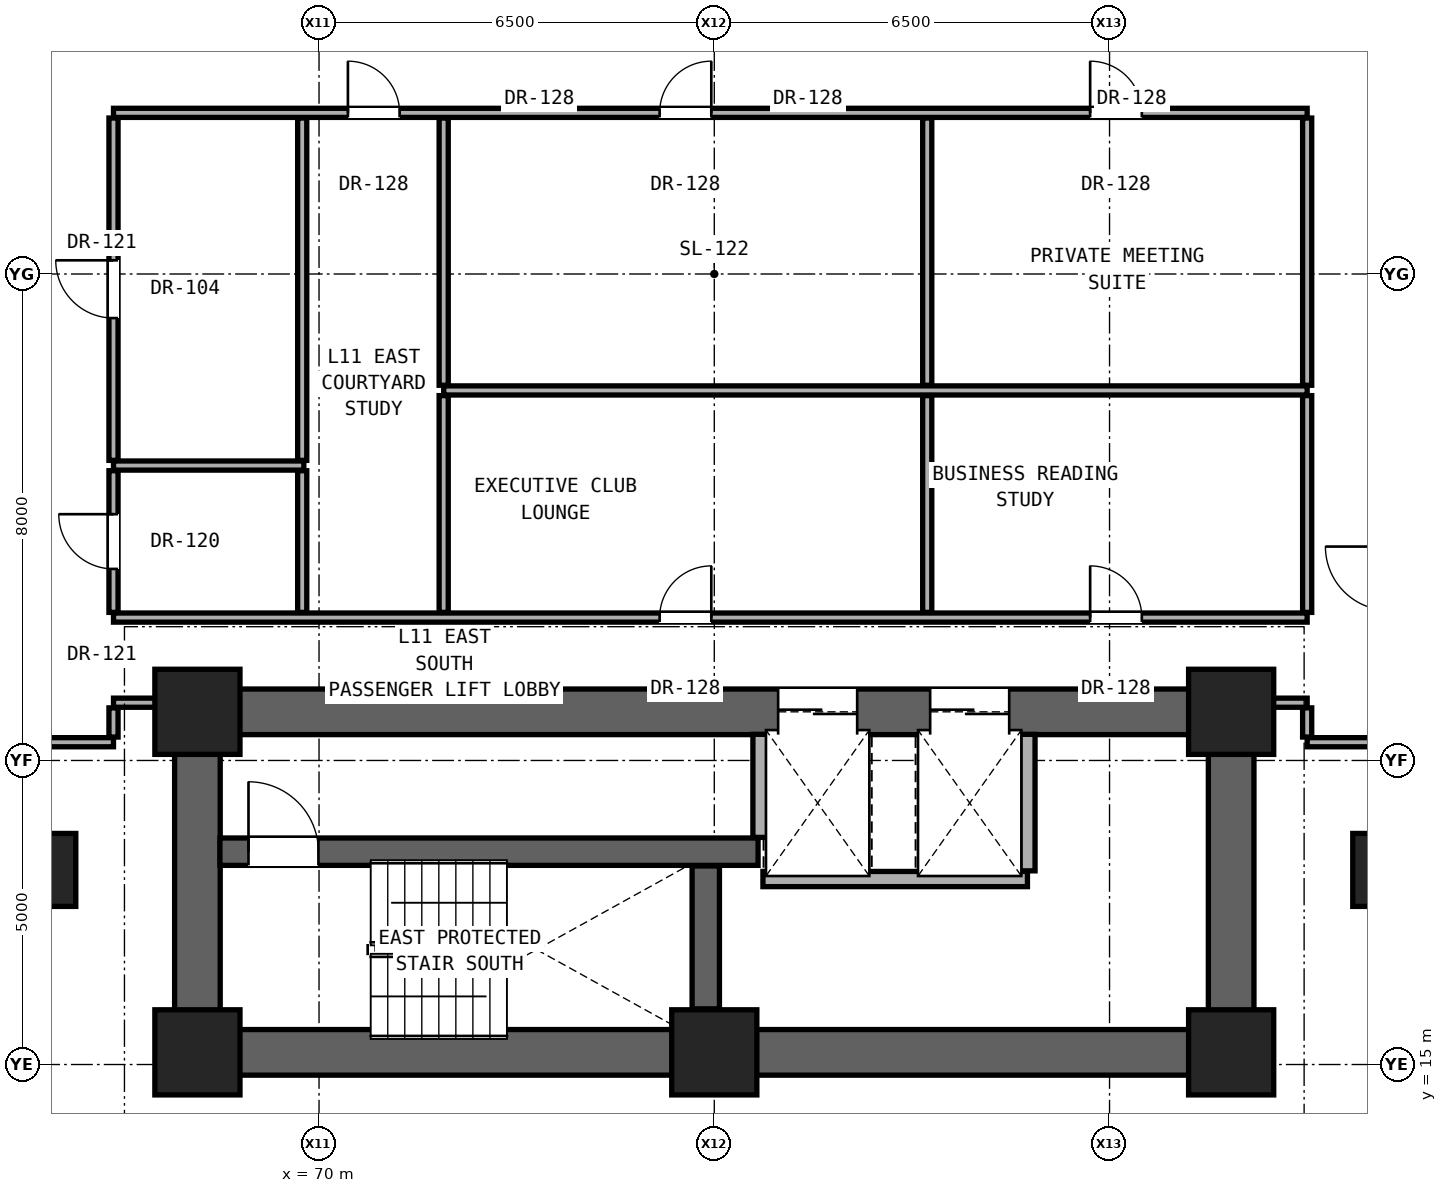
"""IFC4 building model, lengths in metres.
Left out: names, types, materials, properties, quantities, classifications, styles, units other than length and angle.
Written with IfcOpenShell. Run it as: python <this file> out.ifc"""

import sys

from ifc_helpers import new_model, si_unit, direction, frame, frame_2d, origin, origin_2d, place, context, subcontext, project, spatial, rectangle, extrude, element, fill, save


model = new_model("IFC4")
c1 = context("Model", 3, precision=1e-05, world=origin(), true_north=direction((0.0, 1.0)))
c2 = subcontext(c1, "Body", "Model", "MODEL_VIEW")
j1 = project(units=[si_unit("LENGTHUNIT", "METRE"), si_unit("PLANEANGLEUNIT", "RADIAN")], contexts=[c1])
p1 = place(None, origin())
s1 = spatial("IfcSite", under=j1, at=p1, CompositionType="ELEMENT")
p2 = place(p1, origin())
s2 = spatial("IfcBuilding", under=s1, at=p2, CompositionType="ELEMENT")
p3 = place(p2, frame((0.0, 0.0, 42.2)))
s3 = spatial("IfcBuildingStorey", under=s2, at=p3, CompositionType="ELEMENT", Elevation=42.2)
for number, where, z_axis, x_axis in (
    (1, (68.0, 15.2, 0.0), (0.0, 0.0, 1.0), (1.0, 0.0, 0.0)),
    (2, (76.5, 15.2, 0.0), (0.0, 0.0, 1.0), (1.0, 0.0, 0.0)),
    (3, (85.0, 15.2, 0.0), (0.0, 0.0, 1.0), (1.0, 0.0, 0.0)),
    (4, (68.0, 20.8, 0.0), (0.0, 0.0, 1.0), (1.0, 0.0, 0.0)),
    (5, (85.0, 20.8, 0.0), (0.0, 0.0, 1.0), (1.0, 0.0, 0.0)),
):
    element("IfcColumn", number, at=place(p3, frame(where, z_axis=z_axis, x_axis=x_axis)), inside=s3, PredefinedType="COLUMN", context=c2, shape_type="SweptSolid", body=[
        extrude(rectangle(XDim=1.4, YDim=1.4, at=origin_2d()), origin(), (0.0, 0.0, 1.0), 3.3),
    ])
for number, where, z_axis, x_axis in (
    (6, (65.6, 18.2, 0.0), (0.0, 0.0, 1.0), (1.0, 0.0, 0.0)),
    (7, (87.4, 18.2, 0.0), (0.0, 0.0, 1.0), (1.0, 0.0, 0.0)),
):
    element("IfcColumn", number, at=place(p3, frame(where, z_axis=z_axis, x_axis=x_axis)), inside=s3, PredefinedType="PILASTER", context=c2, shape_type="SweptSolid", body=[
        extrude(rectangle(XDim=0.8, YDim=1.2, at=origin_2d()), origin(), (0.0, 0.0, 1.0), 3.3),
    ])
p4 = place(p3, frame((68.0, 15.2, 0.0), z_axis=(0.0, 0.0, 1.0), x_axis=(1.0, 0.0, 0.0)))
e8 = element("IfcWall", 8, at=p4, inside=s3, PredefinedType="SHEAR", context=c2, shape_type="SweptSolid", body=[
    extrude(rectangle(XDim=17.0, YDim=0.75, at=frame_2d((8.5, 0.0))), origin(), (0.0, 0.0, 1.0), 3.06),
])
for number, where, z_axis, x_axis in (
    (9, (68.0, 15.2, 0.0), (0.0, 0.0, 1.0), (0.0, 1.0, 0.0)),
    (10, (85.0, 15.2, 0.0), (0.0, 0.0, 1.0), (0.0, 1.0, 0.0)),
):
    element("IfcWall", number, at=place(p3, frame(where, z_axis=z_axis, x_axis=x_axis)), inside=s3, PredefinedType="SHEAR", context=c2, shape_type="SweptSolid", body=[
        extrude(rectangle(XDim=5.6, YDim=0.75, at=frame_2d((2.8, 0.0))), origin(), (0.0, 0.0, 1.0), 3.06),
    ])
p5 = place(p3, frame((68.0, 20.8, 0.0), z_axis=(0.0, 0.0, 1.0), x_axis=(1.0, 0.0, 0.0)))
e11 = element("IfcWall", 11, at=p5, inside=s3, PredefinedType="SHEAR", context=c2, shape_type="SweptSolid", body=[
    extrude(rectangle(XDim=17.0, YDim=0.75, at=frame_2d((8.5, 0.0))), origin(), (0.0, 0.0, 1.0), 3.06),
])
p6 = place(p5, frame((9.55, 0.0, 0.0)))
e12 = element("IfcOpeningElement", 12, at=p6, cuts=e11, PredefinedType="OPENING", context=c2, shape_type="SweptSolid", body=[
    extrude(rectangle(XDim=1.3, YDim=2.3, at=frame_2d((0.65, 1.15))), frame((0.0, 0.385, 0.0), z_axis=(0.0, -1.0, 0.0), x_axis=(1.0, 0.0, 0.0)), (0.0, 0.0, 1.0), 0.77),
])
p7 = place(p5, frame((12.05, 0.0, 0.0)))
e13 = element("IfcOpeningElement", 13, at=p7, cuts=e11, PredefinedType="OPENING", context=c2, shape_type="SweptSolid", body=[
    extrude(rectangle(XDim=1.3, YDim=2.3, at=frame_2d((0.65, 1.15))), frame((0.0, 0.385, 0.0), z_axis=(0.0, -1.0, 0.0), x_axis=(1.0, 0.0, 0.0)), (0.0, 0.0, 1.0), 0.77),
])
p8 = place(p3, frame((77.3, 18.05, 0.0), z_axis=(0.0, 0.0, 1.0), x_axis=(1.0, 0.0, 0.0)))
e14 = element("IfcWall", 14, at=p8, inside=s3, PredefinedType="SOLIDWALL", context=c2, shape_type="SweptSolid", body=[
    extrude(rectangle(XDim=4.35, YDim=0.25, at=frame_2d((2.175, 0.0))), origin(), (0.0, 0.0, 1.0), 3.06),
])
p9 = place(p3, frame((68.37, 18.5, 0.0), z_axis=(0.0, 0.0, 1.0), x_axis=(1.0, 0.0, 0.0)))
e15 = element("IfcWall", 15, at=p9, inside=s3, PredefinedType="SHEAR", context=c2, shape_type="SweptSolid", body=[
    extrude(rectangle(XDim=8.85, YDim=0.45, at=frame_2d((4.425, 0.0))), origin(), (0.0, 0.0, 1.0), 3.06),
])
p10 = place(p9, frame((0.47, 0.0, 0.0)))
e16 = element("IfcOpeningElement", 16, at=p10, cuts=e15, PredefinedType="OPENING", context=c2, shape_type="SweptSolid", body=[
    extrude(rectangle(XDim=1.15, YDim=2.2, at=frame_2d((0.575, 1.1))), frame((0.0, 0.235, 0.0), z_axis=(0.0, -1.0, 0.0), x_axis=(1.0, 0.0, 0.0)), (0.0, 0.0, 1.0), 0.47),
])
p11 = place(p3, frame((65.25, 20.3, 0.0), z_axis=(0.0, 0.0, 1.0), x_axis=(1.0, 0.0, 0.0)))
e17 = element("IfcWall", 17, at=p11, inside=s3, PredefinedType="PARTITIONING", context=c2, shape_type="SweptSolid", body=[
    extrude(rectangle(XDim=1.37, YDim=0.15, at=frame_2d((0.685, 0.0))), origin(), (0.0, 0.0, 1.0), 3.06),
])
p12 = place(p3, frame((86.25, 20.3, 0.0), z_axis=(0.0, 0.0, 1.0), x_axis=(1.0, 0.0, 0.0)))
e18 = element("IfcWall", 18, at=p12, inside=s3, PredefinedType="PARTITIONING", context=c2, shape_type="SweptSolid", body=[
    extrude(rectangle(XDim=1.35, YDim=0.15, at=frame_2d((0.675, 0.0))), origin(), (0.0, 0.0, 1.0), 3.06),
])
p13 = place(p3, frame((66.62, 20.95, 0.0), z_axis=(0.0, 0.0, 1.0), x_axis=(1.0, 0.0, 0.0)))
e19 = element("IfcWall", 19, at=p13, inside=s3, PredefinedType="PARTITIONING", context=c2, shape_type="SweptSolid", body=[
    extrude(rectangle(XDim=1.01, YDim=0.15, at=frame_2d((0.505, 0.0))), origin(), (0.0, 0.0, 1.0), 2.452),
])
p14 = place(p3, frame((85.37, 20.95, 0.0), z_axis=(0.0, 0.0, 1.0), x_axis=(1.0, 0.0, 0.0)))
e20 = element("IfcWall", 20, at=p14, inside=s3, PredefinedType="PARTITIONING", context=c2, shape_type="SweptSolid", body=[
    extrude(rectangle(XDim=0.88, YDim=0.15, at=frame_2d((0.44, 0.0))), origin(), (0.0, 0.0, 1.0), 2.452),
])
p15 = place(p3, frame((66.62, 22.35, 0.0), z_axis=(0.0, 0.0, 1.0), x_axis=(1.0, 0.0, 0.0)))
e21 = element("IfcWall", 21, at=p15, inside=s3, PredefinedType="PARTITIONING", context=c2, shape_type="SweptSolid", body=[
    extrude(rectangle(XDim=19.63, YDim=0.15, at=frame_2d((9.815, 0.0))), origin(), (0.0, 0.0, 1.0), 2.125),
])
p16 = place(p15, frame((8.981, 0.0, 0.0)))
e22 = element("IfcOpeningElement", 22, at=p16, cuts=e21, PredefinedType="OPENING", context=c2, shape_type="SweptSolid", body=[
    extrude(rectangle(XDim=0.85, YDim=2.01, at=frame_2d((0.425, 1.005))), frame((0.0, 0.085, 0.0), z_axis=(0.0, -1.0, 0.0), x_axis=(1.0, 0.0, 0.0)), (0.0, 0.0, 1.0), 0.17),
])
p17 = place(p15, frame((16.061, 0.0, 0.0)))
e23 = element("IfcOpeningElement", 23, at=p17, cuts=e21, PredefinedType="OPENING", context=c2, shape_type="SweptSolid", body=[
    extrude(rectangle(XDim=0.85, YDim=2.01, at=frame_2d((0.425, 1.005))), frame((0.0, 0.085, 0.0), z_axis=(0.0, -1.0, 0.0), x_axis=(1.0, 0.0, 0.0)), (0.0, 0.0, 1.0), 0.17),
])
p18 = place(p3, frame((66.62, 24.85, 0.0), z_axis=(0.0, 0.0, 1.0), x_axis=(1.0, 0.0, 0.0)))
e24 = element("IfcWall", 24, at=p18, inside=s3, PredefinedType="PARTITIONING", context=c2, shape_type="SweptSolid", body=[
    extrude(rectangle(XDim=3.13, YDim=0.15, at=frame_2d((1.565, 0.0))), origin(), (0.0, 0.0, 1.0), 2.125),
])
p19 = place(p3, frame((72.05, 26.085, 0.0), z_axis=(0.0, 0.0, 1.0), x_axis=(1.0, 0.0, 0.0)))
e25 = element("IfcWall", 25, at=p19, inside=s3, PredefinedType="PARTITIONING", context=c2, shape_type="SweptSolid", body=[
    extrude(rectangle(XDim=14.2, YDim=0.15, at=frame_2d((7.1, 0.0))), origin(), (0.0, 0.0, 1.0), 2.125),
])
p20 = place(p3, frame((66.62, 30.65, 0.0), z_axis=(0.0, 0.0, 1.0), x_axis=(1.0, 0.0, 0.0)))
e26 = element("IfcWall", 26, at=p20, inside=s3, PredefinedType="PARTITIONING", context=c2, shape_type="SweptSolid", body=[
    extrude(rectangle(XDim=19.63, YDim=0.15, at=frame_2d((9.815, 0.0))), origin(), (0.0, 0.0, 1.0), 2.125),
])
p21 = place(p20, frame((3.855, 0.0, 0.0)))
e27 = element("IfcOpeningElement", 27, at=p21, cuts=e26, PredefinedType="OPENING", context=c2, shape_type="SweptSolid", body=[
    extrude(rectangle(XDim=0.85, YDim=2.01, at=frame_2d((0.425, 1.005))), frame((0.0, 0.085, 0.0), z_axis=(0.0, -1.0, 0.0), x_axis=(1.0, 0.0, 0.0)), (0.0, 0.0, 1.0), 0.17),
])
p22 = place(p20, frame((8.981, 0.0, 0.0)))
e28 = element("IfcOpeningElement", 28, at=p22, cuts=e26, PredefinedType="OPENING", context=c2, shape_type="SweptSolid", body=[
    extrude(rectangle(XDim=0.85, YDim=2.01, at=frame_2d((0.425, 1.005))), frame((0.0, 0.085, 0.0), z_axis=(0.0, -1.0, 0.0), x_axis=(1.0, 0.0, 0.0)), (0.0, 0.0, 1.0), 0.17),
])
p23 = place(p20, frame((16.061, 0.0, 0.0)))
e29 = element("IfcOpeningElement", 29, at=p23, cuts=e26, PredefinedType="OPENING", context=c2, shape_type="SweptSolid", body=[
    extrude(rectangle(XDim=0.85, YDim=2.01, at=frame_2d((0.425, 1.005))), frame((0.0, 0.085, 0.0), z_axis=(0.0, -1.0, 0.0), x_axis=(1.0, 0.0, 0.0)), (0.0, 0.0, 1.0), 0.17),
])
p24 = place(p3, frame((66.62, 20.385, 0.0), z_axis=(0.0, 0.0, 1.0), x_axis=(0.0, 1.0, 0.0)))
e30 = element("IfcWall", 30, at=p24, inside=s3, PredefinedType="PARTITIONING", context=c2, shape_type="SweptSolid", body=[
    extrude(rectangle(XDim=0.48, YDim=0.15, at=frame_2d((0.24, 0.0))), origin(), (0.0, 0.0, 1.0), 2.452),
])
p25 = place(p3, frame((66.62, 22.435, 0.0), z_axis=(0.0, 0.0, 1.0), x_axis=(0.0, 1.0, 0.0)))
e31 = element("IfcWall", 31, at=p25, inside=s3, PredefinedType="PARTITIONING", context=c2, shape_type="SweptSolid", body=[
    extrude(rectangle(XDim=2.33, YDim=0.15, at=frame_2d((1.165, 0.0))), origin(), (0.0, 0.0, 1.0), 3.06),
])
p26 = place(p25, frame((0.715, 0.0, 0.0)))
e32 = element("IfcOpeningElement", 32, at=p26, cuts=e31, PredefinedType="OPENING", context=c2, shape_type="SweptSolid", body=[
    extrude(rectangle(XDim=0.9, YDim=2.1, at=frame_2d((0.45, 1.05))), frame((0.0, 0.085, 0.0), z_axis=(0.0, -1.0, 0.0), x_axis=(1.0, 0.0, 0.0)), (0.0, 0.0, 1.0), 0.17),
])
p27 = place(p3, frame((66.62, 24.935, 0.0), z_axis=(0.0, 0.0, 1.0), x_axis=(0.0, 1.0, 0.0)))
e33 = element("IfcWall", 33, at=p27, inside=s3, PredefinedType="PARTITIONING", context=c2, shape_type="SweptSolid", body=[
    extrude(rectangle(XDim=5.63, YDim=0.15, at=frame_2d((2.815, 0.0))), origin(), (0.0, 0.0, 1.0), 2.279),
])
p28 = place(p27, frame((2.34, 0.0, 0.0)))
e34 = element("IfcOpeningElement", 34, at=p28, cuts=e33, PredefinedType="OPENING", context=c2, shape_type="SweptSolid", body=[
    extrude(rectangle(XDim=0.95, YDim=2.15, at=frame_2d((0.475, 1.075))), frame((0.0, 0.085, 0.0), z_axis=(0.0, -1.0, 0.0), x_axis=(1.0, 0.0, 0.0)), (0.0, 0.0, 1.0), 0.17),
])
p29 = place(p3, frame((69.723, 22.435, 0.0), z_axis=(0.0, 0.0, 1.0), x_axis=(0.0, 1.0, 0.0)))
e35 = element("IfcWall", 35, at=p29, inside=s3, PredefinedType="PARTITIONING", context=c2, shape_type="SweptSolid", body=[
    extrude(rectangle(XDim=2.33, YDim=0.15, at=frame_2d((1.165, 0.0))), origin(), (0.0, 0.0, 1.0), 3.06),
])
p30 = place(p3, frame((69.723, 24.935, 0.0), z_axis=(0.0, 0.0, 1.0), x_axis=(0.0, 1.0, 0.0)))
e36 = element("IfcWall", 36, at=p30, inside=s3, PredefinedType="PARTITIONING", context=c2, shape_type="SweptSolid", body=[
    extrude(rectangle(XDim=5.63, YDim=0.15, at=frame_2d((2.815, 0.0))), origin(), (0.0, 0.0, 1.0), 2.125),
])
p31 = place(p3, frame((72.05, 22.435, 0.0), z_axis=(0.0, 0.0, 1.0), x_axis=(0.0, 1.0, 0.0)))
e37 = element("IfcWall", 37, at=p31, inside=s3, PredefinedType="PARTITIONING", context=c2, shape_type="SweptSolid", body=[
    extrude(rectangle(XDim=3.565, YDim=0.15, at=frame_2d((1.782, 0.0))), origin(), (0.0, 0.0, 1.0), 2.589),
])
p32 = place(p3, frame((72.05, 26.17, 0.0), z_axis=(0.0, 0.0, 1.0), x_axis=(0.0, 1.0, 0.0)))
e38 = element("IfcWall", 38, at=p32, inside=s3, PredefinedType="PARTITIONING", context=c2, shape_type="SweptSolid", body=[
    extrude(rectangle(XDim=4.395, YDim=0.15, at=frame_2d((2.198, 0.0))), origin(), (0.0, 0.0, 1.0), 2.125),
])
p33 = place(p3, frame((76.36, 15.915, 0.0), z_axis=(0.0, 0.0, 1.0), x_axis=(0.0, 1.0, 0.0)))
e39 = element("IfcWall", 39, at=p33, inside=s3, PredefinedType="SHEAR", context=c2, shape_type="SweptSolid", body=[
    extrude(rectangle(XDim=2.35, YDim=0.45, at=frame_2d((1.175, 0.0))), origin(), (0.0, 0.0, 1.0), 3.06),
])
p34 = place(p3, frame((77.26, 18.735, 0.0), z_axis=(0.0, 0.0, 1.0), x_axis=(0.0, 1.0, 0.0)))
e40 = element("IfcWall", 40, at=p34, inside=s3, PredefinedType="SOLIDWALL", context=c2, shape_type="SweptSolid", body=[
    extrude(rectangle(XDim=1.695, YDim=0.25, at=frame_2d((0.847, 0.0))), origin(), (0.0, 0.0, 1.0), 3.06),
])
p35 = place(p3, frame((80.002, 22.435, 0.0), z_axis=(0.0, 0.0, 1.0), x_axis=(0.0, 1.0, 0.0)))
e41 = element("IfcWall", 41, at=p35, inside=s3, PredefinedType="PARTITIONING", context=c2, shape_type="SweptSolid", body=[
    extrude(rectangle(XDim=3.565, YDim=0.15, at=frame_2d((1.782, 0.0))), origin(), (0.0, 0.0, 1.0), 3.06),
])
p36 = place(p3, frame((80.002, 26.17, 0.0), z_axis=(0.0, 0.0, 1.0), x_axis=(0.0, 1.0, 0.0)))
e42 = element("IfcWall", 42, at=p36, inside=s3, PredefinedType="PARTITIONING", context=c2, shape_type="SweptSolid", body=[
    extrude(rectangle(XDim=4.395, YDim=0.15, at=frame_2d((2.198, 0.0))), origin(), (0.0, 0.0, 1.0), 2.125),
])
p37 = place(p3, frame((81.65, 18.185, 0.0), z_axis=(0.0, 0.0, 1.0), x_axis=(0.0, 1.0, 0.0)))
e43 = element("IfcWall", 43, at=p37, inside=s3, PredefinedType="SOLIDWALL", context=c2, shape_type="SweptSolid", body=[
    extrude(rectangle(XDim=2.245, YDim=0.25, at=frame_2d((1.123, 0.0))), origin(), (0.0, 0.0, 1.0), 3.06),
])
p38 = place(p3, frame((86.25, 20.385, 0.0), z_axis=(0.0, 0.0, 1.0), x_axis=(0.0, 1.0, 0.0)))
e44 = element("IfcWall", 44, at=p38, inside=s3, PredefinedType="PARTITIONING", context=c2, shape_type="SweptSolid", body=[
    extrude(rectangle(XDim=0.48, YDim=0.15, at=frame_2d((0.24, 0.0))), origin(), (0.0, 0.0, 1.0), 2.452),
])
p39 = place(p3, frame((86.25, 22.435, 0.0), z_axis=(0.0, 0.0, 1.0), x_axis=(0.0, 1.0, 0.0)))
e45 = element("IfcWall", 45, at=p39, inside=s3, PredefinedType="PARTITIONING", context=c2, shape_type="SweptSolid", body=[
    extrude(rectangle(XDim=3.565, YDim=0.15, at=frame_2d((1.782, 0.0))), origin(), (0.0, 0.0, 1.0), 3.06),
])
p40 = place(p3, frame((86.25, 26.17, 0.0), z_axis=(0.0, 0.0, 1.0), x_axis=(0.0, 1.0, 0.0)))
e46 = element("IfcWall", 46, at=p40, inside=s3, PredefinedType="PARTITIONING", context=c2, shape_type="SweptSolid", body=[
    extrude(rectangle(XDim=4.395, YDim=0.15, at=frame_2d((2.198, 0.0))), origin(), (0.0, 0.0, 1.0), 2.279),
])
p41 = place(p10, origin())
e47 = element("IfcDoor", 47, at=p41, inside=s3, OperationType="SINGLE_SWING_LEFT", PredefinedType="DOOR", context=c2, shape_type="SweptSolid", body=[
    extrude(rectangle(XDim=1.15, YDim=2.2, at=frame_2d((0.575, 1.1))), frame((0.0, 0.025, 0.0), z_axis=(0.0, -1.0, 0.0), x_axis=(1.0, 0.0, 0.0)), (0.0, 0.0, 1.0), 0.05),
])
fill(e16, e47)
p42 = place(p26, origin())
e48 = element("IfcDoor", 48, at=p42, inside=s3, OperationType="SINGLE_SWING_RIGHT", PredefinedType="DOOR", context=c2, shape_type="SweptSolid", body=[
    extrude(rectangle(XDim=0.9, YDim=2.1, at=frame_2d((0.45, 1.05))), frame((0.0, 0.025, 0.0), z_axis=(0.0, -1.0, 0.0), x_axis=(1.0, 0.0, 0.0)), (0.0, 0.0, 1.0), 0.05),
])
fill(e32, e48)
p43 = place(p28, origin())
e49 = element("IfcDoor", 49, at=p43, inside=s3, OperationType="SINGLE_SWING_RIGHT", PredefinedType="DOOR", context=c2, shape_type="SweptSolid", body=[
    extrude(rectangle(XDim=0.95, YDim=2.15, at=frame_2d((0.475, 1.075))), frame((0.0, 0.025, 0.0), z_axis=(0.0, -1.0, 0.0), x_axis=(1.0, 0.0, 0.0)), (0.0, 0.0, 1.0), 0.05),
])
fill(e34, e49)
p44 = place(p21, origin())
e50 = element("IfcDoor", 50, at=p44, inside=s3, OperationType="SINGLE_SWING_LEFT", PredefinedType="DOOR", context=c2, shape_type="SweptSolid", body=[
    extrude(rectangle(XDim=0.85, YDim=2.01, at=frame_2d((0.425, 1.005))), frame((0.0, 0.025, 0.0), z_axis=(0.0, -1.0, 0.0), x_axis=(1.0, 0.0, 0.0)), (0.0, 0.0, 1.0), 0.05),
])
fill(e27, e50)
p45 = place(p16, origin())
e51 = element("IfcDoor", 51, at=p45, inside=s3, OperationType="SINGLE_SWING_RIGHT", PredefinedType="DOOR", context=c2, shape_type="SweptSolid", body=[
    extrude(rectangle(XDim=0.85, YDim=2.01, at=frame_2d((0.425, 1.005))), frame((0.0, 0.025, 0.0), z_axis=(0.0, -1.0, 0.0), x_axis=(1.0, 0.0, 0.0)), (0.0, 0.0, 1.0), 0.05),
])
fill(e22, e51)
p46 = place(p17, origin())
e52 = element("IfcDoor", 52, at=p46, inside=s3, OperationType="SINGLE_SWING_LEFT", PredefinedType="DOOR", context=c2, shape_type="SweptSolid", body=[
    extrude(rectangle(XDim=0.85, YDim=2.01, at=frame_2d((0.425, 1.005))), frame((0.0, 0.025, 0.0), z_axis=(0.0, -1.0, 0.0), x_axis=(1.0, 0.0, 0.0)), (0.0, 0.0, 1.0), 0.05),
])
fill(e23, e52)
p47 = place(p22, origin())
e53 = element("IfcDoor", 53, at=p47, inside=s3, OperationType="SINGLE_SWING_RIGHT", PredefinedType="DOOR", context=c2, shape_type="SweptSolid", body=[
    extrude(rectangle(XDim=0.85, YDim=2.01, at=frame_2d((0.425, 1.005))), frame((0.0, 0.025, 0.0), z_axis=(0.0, -1.0, 0.0), x_axis=(1.0, 0.0, 0.0)), (0.0, 0.0, 1.0), 0.05),
])
fill(e28, e53)
p48 = place(p23, origin())
e54 = element("IfcDoor", 54, at=p48, inside=s3, OperationType="SINGLE_SWING_LEFT", PredefinedType="DOOR", context=c2, shape_type="SweptSolid", body=[
    extrude(rectangle(XDim=0.85, YDim=2.01, at=frame_2d((0.425, 1.005))), frame((0.0, 0.025, 0.0), z_axis=(0.0, -1.0, 0.0), x_axis=(1.0, 0.0, 0.0)), (0.0, 0.0, 1.0), 0.05),
])
fill(e29, e54)
p49 = place(p6, origin())
e55 = element("IfcDoor", 55, at=p49, inside=s3, OperationType="DOUBLE_DOOR_SLIDING", PredefinedType="DOOR", context=c2, shape_type="SweptSolid", body=[
    extrude(rectangle(XDim=1.3, YDim=2.3, at=frame_2d((0.65, 1.15))), frame((0.0, 0.025, 0.0), z_axis=(0.0, -1.0, 0.0), x_axis=(1.0, 0.0, 0.0)), (0.0, 0.0, 1.0), 0.05),
])
fill(e12, e55)
p50 = place(p7, origin())
e56 = element("IfcDoor", 56, at=p50, inside=s3, OperationType="DOUBLE_DOOR_SLIDING", PredefinedType="DOOR", context=c2, shape_type="SweptSolid", body=[
    extrude(rectangle(XDim=1.3, YDim=2.3, at=frame_2d((0.65, 1.15))), frame((0.0, 0.025, 0.0), z_axis=(0.0, -1.0, 0.0), x_axis=(1.0, 0.0, 0.0)), (0.0, 0.0, 1.0), 0.05),
])
fill(e13, e56)
save(model, sys.argv[1])
